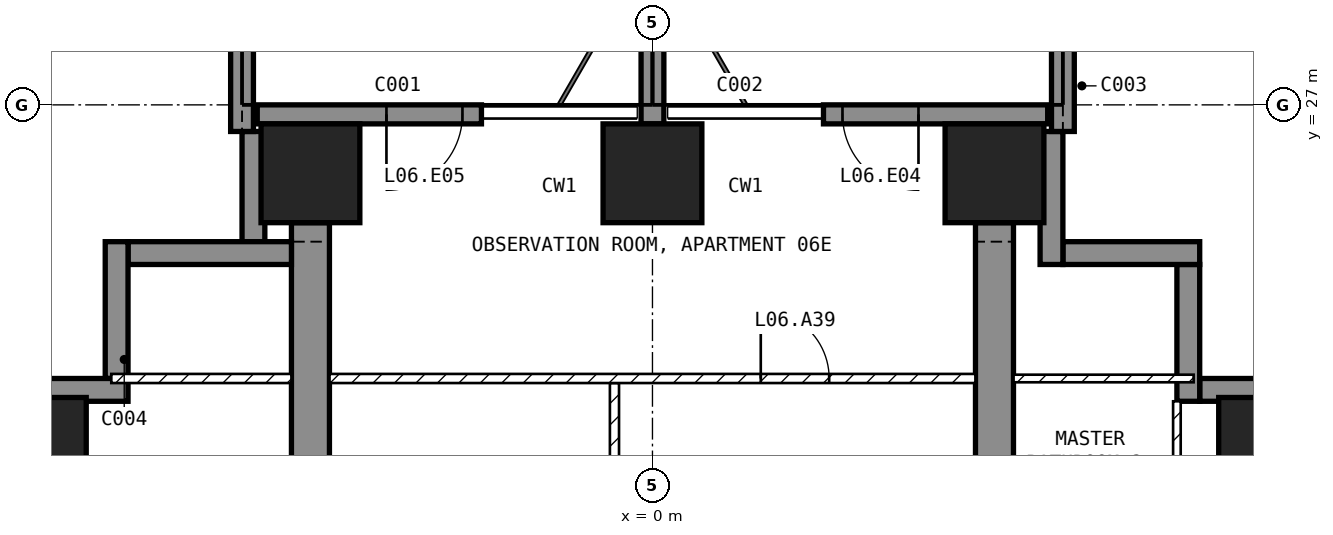
"""IFC4 building model, lengths in metres.
Left out: names, types, materials, properties, quantities, classifications, styles, units other than length and angle.
Written with IfcOpenShell. Run it as: python <this file> out.ifc"""

import sys

from ifc_helpers import new_model, si_unit, direction, frame, frame_2d, origin, origin_2d, place, context, subcontext, project, spatial, polyline, rectangle, outline, extrude, element, fill, save


model = new_model("IFC4")
c1 = context("Model", 3, precision=1e-05, world=origin(), true_north=direction((0.0, 1.0)))
c2 = subcontext(c1, "Body", "Model", "MODEL_VIEW")
j1 = project(units=[si_unit("LENGTHUNIT", "METRE"), si_unit("PLANEANGLEUNIT", "RADIAN")], contexts=[c1])
p1 = place(None, origin())
s1 = spatial("IfcSite", under=j1, at=p1, CompositionType="ELEMENT")
p2 = place(p1, origin())
s2 = spatial("IfcBuilding", under=s1, at=p2, CompositionType="ELEMENT")
p3 = place(p2, frame((0.0, 0.0, 40.0)))
s3 = spatial("IfcBuildingStorey", under=s2, at=p3, CompositionType="ELEMENT", Elevation=40.0)
for number, where, z_axis, x_axis in (
    (1, (-8.1, 22.5, -0.25), (0.0, 0.0, 1.0), (1.0, 0.0, 0.0)),
    (2, (-4.5, 26.1, -0.25), (0.0, 0.0, 1.0), (1.0, 0.0, 0.0)),
    (3, (0.0, 26.1, -0.25), (0.0, 0.0, 1.0), (1.0, 0.0, 0.0)),
    (4, (4.5, 26.1, -0.25), (0.0, 0.0, 1.0), (1.0, 0.0, 0.0)),
    (5, (8.1, 22.5, -0.25), (0.0, 0.0, 1.0), (1.0, 0.0, 0.0)),
):
    element("IfcColumn", number, at=place(p3, frame(where, z_axis=z_axis, x_axis=x_axis)), inside=s3, PredefinedType="COLUMN", context=c2, shape_type="SweptSolid", body=[
        extrude(rectangle(XDim=1.3, YDim=1.3, at=origin_2d()), origin(), (0.0, 0.0, 1.0), 3.5),
    ])
for number, where, z_axis, x_axis in (
    (6, (-4.75, 9.0, -0.25), (1.0, 0.0, 0.0), (0.0, 1.0, 0.0)),
    (7, (4.25, 9.0, -0.25), (1.0, 0.0, 0.0), (0.0, 1.0, 0.0)),
):
    element("IfcWall", number, at=place(p3, frame(where, z_axis=z_axis, x_axis=x_axis)), inside=s3, PredefinedType="SHEAR", context=c2, shape_type="SweptSolid", body=[
        extrude(outline(polyline([(0.0, 0.0), (2.1, 0.0), (2.1, 2.65), (4.5, 2.65), (4.5, 0.0), (9.9, 0.0), (9.9, 2.65), (12.3, 2.65), (12.3, 0.0), (16.45, 0.0), (16.45, 3.5), (0.0, 3.5), (0.0, 0.0)])), origin(), (0.0, 0.0, 1.0), 0.5),
    ])
p4 = place(p3, frame((5.2, 26.875, 0.0), z_axis=(0.0, 0.0, 1.0), x_axis=(-1.0, 0.0, 0.0)))
e8 = element("IfcWall", 8, at=p4, inside=s3, PredefinedType="SOLIDWALL", context=c2, shape_type="SweptSolid", body=[
    extrude(rectangle(XDim=2.95, YDim=0.25, at=frame_2d((1.475, 0.0))), origin(), (0.0, 0.0, 1.0), 3.25),
])
p5 = place(p4, frame((1.7, 0.0, 0.0)))
e9 = element("IfcOpeningElement", 9, at=p5, cuts=e8, PredefinedType="OPENING", context=c2, shape_type="SweptSolid", body=[
    extrude(rectangle(XDim=1.0, YDim=2.4, at=frame_2d((0.5, 1.2))), frame((0.0, 0.135, 0.0), z_axis=(0.0, -1.0, 0.0), x_axis=(1.0, 0.0, 0.0)), (0.0, 0.0, 1.0), 0.27),
])
p6 = place(p3, frame((-2.25, 26.875, 0.0), z_axis=(0.0, 0.0, 1.0), x_axis=(-1.0, 0.0, 0.0)))
e10 = element("IfcWall", 10, at=p6, inside=s3, PredefinedType="SOLIDWALL", context=c2, shape_type="SweptSolid", body=[
    extrude(rectangle(XDim=2.95, YDim=0.25, at=frame_2d((1.475, 0.0))), origin(), (0.0, 0.0, 1.0), 3.25),
])
p7 = place(p6, frame((0.25, 0.0, 0.0)))
e11 = element("IfcOpeningElement", 11, at=p7, cuts=e10, PredefinedType="OPENING", context=c2, shape_type="SweptSolid", body=[
    extrude(rectangle(XDim=1.0, YDim=2.4, at=frame_2d((0.5, 1.2))), frame((0.0, 0.135, 0.0), z_axis=(0.0, -1.0, 0.0), x_axis=(1.0, 0.0, 0.0)), (0.0, 0.0, 1.0), 0.27),
])
p8 = place(p3, frame((8.65, 23.25, 0.0), z_axis=(0.0, 0.0, 1.0), x_axis=(-1.0, 0.0, 0.0)))
e12 = element("IfcWall", 12, at=p8, inside=s3, PredefinedType="SOLIDWALL", context=c2, shape_type="SweptSolid", body=[
    extrude(rectangle(XDim=1.45, YDim=0.3, at=frame_2d((0.725, 0.0))), origin(), (0.0, 0.0, 1.0), 3.25),
])
p9 = place(p3, frame((7.05, 23.1, 0.0), z_axis=(0.0, 0.0, 1.0), x_axis=(0.0, 1.0, 0.0)))
e13 = element("IfcWall", 13, at=p9, inside=s3, PredefinedType="SOLIDWALL", context=c2, shape_type="SweptSolid", body=[
    extrude(rectangle(XDim=1.8, YDim=0.3, at=frame_2d((0.9, 0.0))), origin(), (0.0, 0.0, 1.0), 3.25),
])
p10 = place(p3, frame((7.2, 25.05, 0.0), z_axis=(0.0, 0.0, 1.0), x_axis=(-1.0, 0.0, 0.0)))
e14 = element("IfcWall", 14, at=p10, inside=s3, PredefinedType="SOLIDWALL", context=c2, shape_type="SweptSolid", body=[
    extrude(rectangle(XDim=1.8, YDim=0.3, at=frame_2d((0.9, 0.0))), origin(), (0.0, 0.0, 1.0), 3.25),
])
p11 = place(p3, frame((5.25, 24.9, 0.0), z_axis=(0.0, 0.0, 1.0), x_axis=(0.0, 1.0, 0.0)))
e15 = element("IfcWall", 15, at=p11, inside=s3, PredefinedType="SOLIDWALL", context=c2, shape_type="SweptSolid", body=[
    extrude(rectangle(XDim=1.75, YDim=0.3, at=frame_2d((0.875, 0.0))), origin(), (0.0, 0.0, 1.0), 3.25),
])
p12 = place(p3, frame((-5.25, 26.65, 0.0), z_axis=(0.0, 0.0, 1.0), x_axis=(0.0, -1.0, 0.0)))
e16 = element("IfcWall", 16, at=p12, inside=s3, PredefinedType="SOLIDWALL", context=c2, shape_type="SweptSolid", body=[
    extrude(rectangle(XDim=1.45, YDim=0.3, at=frame_2d((0.725, 0.0))), origin(), (0.0, 0.0, 1.0), 3.25),
])
p13 = place(p3, frame((-4.75, 25.05, 0.0), z_axis=(0.0, 0.0, 1.0), x_axis=(-1.0, 0.0, 0.0)))
e17 = element("IfcWall", 17, at=p13, inside=s3, PredefinedType="SOLIDWALL", context=c2, shape_type="SweptSolid", body=[
    extrude(rectangle(XDim=2.15, YDim=0.3, at=frame_2d((1.075, 0.0))), origin(), (0.0, 0.0, 1.0), 3.25),
])
p14 = place(p3, frame((-7.05, 25.2, 0.0), z_axis=(0.0, 0.0, 1.0), x_axis=(0.0, -1.0, 0.0)))
e18 = element("IfcWall", 18, at=p14, inside=s3, PredefinedType="SOLIDWALL", context=c2, shape_type="SweptSolid", body=[
    extrude(rectangle(XDim=1.8, YDim=0.3, at=frame_2d((0.9, 0.0))), origin(), (0.0, 0.0, 1.0), 3.25),
])
p15 = place(p3, frame((-6.9, 23.25, 0.0), z_axis=(0.0, 0.0, 1.0), x_axis=(-1.0, 0.0, 0.0)))
e19 = element("IfcWall", 19, at=p15, inside=s3, PredefinedType="SOLIDWALL", context=c2, shape_type="SweptSolid", body=[
    extrude(rectangle(XDim=1.75, YDim=0.3, at=frame_2d((0.875, 0.0))), origin(), (0.0, 0.0, 1.0), 3.25),
])
p16 = place(p3, frame((-5.4, 26.65, 0.0), z_axis=(0.0, 0.0, 1.0), x_axis=(0.0, 1.0, 0.0)))
e20 = element("IfcWall", 20, at=p16, inside=s3, PredefinedType="SOLIDWALL", context=c2, shape_type="SweptSolid", body=[
    extrude(rectangle(XDim=3.05, YDim=0.3, at=frame_2d((1.525, 0.0))), origin(), (0.0, 0.0, 1.0), 3.25),
])
p17 = place(p3, frame((0.0, 26.75, 0.0), z_axis=(0.0, 0.0, 1.0), x_axis=(0.0, 1.0, 0.0)))
e21 = element("IfcWall", 21, at=p17, inside=s3, PredefinedType="SOLIDWALL", context=c2, shape_type="SweptSolid", body=[
    extrude(rectangle(XDim=2.95, YDim=0.3, at=frame_2d((1.475, 0.0))), origin(), (0.0, 0.0, 1.0), 3.25),
])
p18 = place(p3, frame((5.4, 26.65, 0.0), z_axis=(0.0, 0.0, 1.0), x_axis=(0.0, 1.0, 0.0)))
e22 = element("IfcWall", 22, at=p18, inside=s3, PredefinedType="SOLIDWALL", context=c2, shape_type="SweptSolid", body=[
    extrude(rectangle(XDim=3.05, YDim=0.3, at=frame_2d((1.525, 0.0))), origin(), (0.0, 0.0, 1.0), 3.25),
])
p19 = place(p3, frame((-0.5, 18.96, 0.0), z_axis=(0.0, 0.0, 1.0), x_axis=(0.0, 1.0, 0.0)))
e23 = element("IfcWall", 23, at=p19, inside=s3, PredefinedType="PARTITIONING", context=c2, shape_type="SweptSolid", body=[
    extrude(rectangle(XDim=4.38, YDim=0.12, at=frame_2d((2.19, 0.0))), origin(), (0.0, 0.0, 1.0), 3.25),
])
p20 = place(p19, frame((1.74, 0.0, 0.0)))
e24 = element("IfcOpeningElement", 24, at=p20, cuts=e23, PredefinedType="OPENING", context=c2, shape_type="SweptSolid", body=[
    extrude(rectangle(XDim=0.9, YDim=2.1, at=frame_2d((0.45, 1.05))), frame((0.0, 0.07, 0.0), z_axis=(0.0, -1.0, 0.0), x_axis=(1.0, 0.0, 0.0)), (0.0, 0.0, 1.0), 0.14),
])
p21 = place(p3, frame((-4.25, 23.4, 0.0), z_axis=(0.0, 0.0, 1.0), x_axis=(1.0, 0.0, 0.0)))
e25 = element("IfcWall", 25, at=p21, inside=s3, PredefinedType="PARTITIONING", context=c2, shape_type="SweptSolid", body=[
    extrude(rectangle(XDim=8.5, YDim=0.12, at=frame_2d((4.25, 0.0))), origin(), (0.0, 0.0, 1.0), 3.25),
])
p22 = place(p21, frame((5.675, 0.0, 0.0)))
e26 = element("IfcOpeningElement", 26, at=p22, cuts=e25, PredefinedType="OPENING", context=c2, shape_type="SweptSolid", body=[
    extrude(rectangle(XDim=0.9, YDim=2.1, at=frame_2d((0.45, 1.05))), frame((0.0, 0.07, 0.0), z_axis=(0.0, -1.0, 0.0), x_axis=(1.0, 0.0, 0.0)), (0.0, 0.0, 1.0), 0.14),
])
p23 = place(p3, frame((6.9, 20.45, 0.0), z_axis=(0.0, 0.0, 1.0), x_axis=(0.0, 1.0, 0.0)))
e27 = element("IfcWall", 27, at=p23, inside=s3, PredefinedType="PARTITIONING", context=c2, shape_type="SweptSolid", body=[
    extrude(rectangle(XDim=2.65, YDim=0.1, at=frame_2d((1.325, 0.0))), origin(), (0.0, 0.0, 1.0), 3.25),
])
p24 = place(p3, frame((4.75, 23.4, 0.0), z_axis=(0.0, 0.0, 1.0), x_axis=(1.0, 0.0, 0.0)))
e28 = element("IfcWall", 28, at=p24, inside=s3, PredefinedType="PARTITIONING", context=c2, shape_type="SweptSolid", body=[
    extrude(rectangle(XDim=2.37, YDim=0.1, at=frame_2d((1.185, 0.0))), origin(), (0.0, 0.0, 1.0), 3.25),
])
p25 = place(p3, frame((-7.12, 23.4, 0.0), z_axis=(0.0, 0.0, 1.0), x_axis=(1.0, 0.0, 0.0)))
e29 = element("IfcWall", 29, at=p25, inside=s3, PredefinedType="PARTITIONING", context=c2, shape_type="SweptSolid", body=[
    extrude(rectangle(XDim=2.37, YDim=0.12, at=frame_2d((1.185, 0.0))), origin(), (0.0, 0.0, 1.0), 3.25),
])
p26 = place(p5, origin())
e30 = element("IfcDoor", 30, at=p26, inside=s3, OperationType="SINGLE_SWING_LEFT", PredefinedType="DOOR", context=c2, shape_type="SweptSolid", body=[
    extrude(rectangle(XDim=1.0, YDim=2.4, at=frame_2d((0.5, 1.2))), frame((0.0, 0.025, 0.0), z_axis=(0.0, -1.0, 0.0), x_axis=(1.0, 0.0, 0.0)), (0.0, 0.0, 1.0), 0.05),
])
fill(e9, e30)
p27 = place(p7, origin())
e31 = element("IfcDoor", 31, at=p27, inside=s3, OperationType="SINGLE_SWING_RIGHT", PredefinedType="DOOR", context=c2, shape_type="SweptSolid", body=[
    extrude(rectangle(XDim=1.0, YDim=2.4, at=frame_2d((0.5, 1.2))), frame((0.0, 0.025, 0.0), z_axis=(0.0, -1.0, 0.0), x_axis=(1.0, 0.0, 0.0)), (0.0, 0.0, 1.0), 0.05),
])
fill(e11, e31)
p28 = place(p22, origin())
e32 = element("IfcDoor", 32, at=p28, inside=s3, OperationType="SINGLE_SWING_LEFT", PredefinedType="DOOR", context=c2, shape_type="SweptSolid", body=[
    extrude(rectangle(XDim=0.9, YDim=2.1, at=frame_2d((0.45, 1.05))), frame((0.0, 0.025, 0.0), z_axis=(0.0, -1.0, 0.0), x_axis=(1.0, 0.0, 0.0)), (0.0, 0.0, 1.0), 0.05),
])
fill(e26, e32)
save(model, sys.argv[1])
